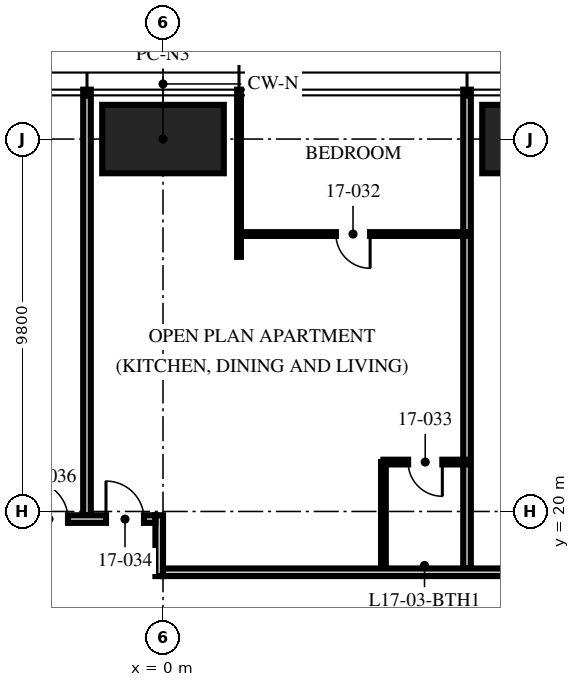
"""IFC4 building model, lengths in metres.
Left out: names, types, materials, properties, quantities, classifications, styles, units other than length and angle.
Written with IfcOpenShell. Run it as: python <this file> out.ifc"""

import sys

from ifc_helpers import new_model, si_unit, direction, frame, frame_2d, origin, origin_2d, place, context, subcontext, project, spatial, rectangle, hollow_rectangle, extrude, element, fill, save


model = new_model("IFC4")
c1 = context("Model", 3, precision=1e-05, world=origin(), true_north=direction((0.0, 1.0)))
c2 = subcontext(c1, "Body", "Model", "MODEL_VIEW")
j1 = project(units=[si_unit("LENGTHUNIT", "METRE"), si_unit("PLANEANGLEUNIT", "RADIAN")], contexts=[c1])
p1 = place(None, origin())
s1 = spatial("IfcSite", under=j1, at=p1, CompositionType="ELEMENT")
p2 = place(p1, origin())
s2 = spatial("IfcBuilding", under=s1, at=p2, CompositionType="ELEMENT")
p3 = place(p2, frame((0.0, 0.0, 69.75)))
s3 = spatial("IfcBuildingStorey", under=s2, at=p3, CompositionType="ELEMENT", Elevation=69.75)
for number, where, z_axis, x_axis in (
    (1, (0.0, 29.8, 0.0), (0.0, 0.0, 1.0), (1.0, 0.0, 0.0)),
    (2, (10.0, 29.8, 0.0), (0.0, 0.0, 1.0), (1.0, 0.0, 0.0)),
):
    element("IfcColumn", number, at=place(p3, frame(where, z_axis=z_axis, x_axis=x_axis)), inside=s3, PredefinedType="COLUMN", context=c2, shape_type="SweptSolid", body=[
        extrude(hollow_rectangle(XDim=3.2, YDim=1.8, WallThickness=0.2, at=origin_2d()), origin(), (0.0, 0.0, 1.0), 3.75),
    ])
p4 = place(p3, frame((8.0, 18.5, 0.0), z_axis=(0.0, 0.0, 1.0), x_axis=(0.0, 1.0, 0.0)))
e3 = element("IfcWall", 3, at=p4, inside=s3, PredefinedType="PARTITIONING", context=c2, shape_type="SweptSolid", body=[
    extrude(rectangle(XDim=12.6, YDim=0.2, at=frame_2d((6.3, 0.0))), origin(), (0.0, 0.0, 1.0), 2.71),
])
p5 = place(p3, frame((2.0, 26.7, 0.0), z_axis=(0.0, 0.0, 1.0), x_axis=(0.0, 1.0, 0.0)))
e4 = element("IfcWall", 4, at=p5, inside=s3, PredefinedType="PARTITIONING", context=c2, shape_type="SweptSolid", body=[
    extrude(rectangle(XDim=4.4, YDim=0.1, at=frame_2d((2.2, 0.0))), origin(), (0.0, 0.0, 1.0), 2.71),
])
p6 = place(p3, frame((-2.0, 19.9, 0.0), z_axis=(0.0, 0.0, 1.0), x_axis=(0.0, 1.0, 0.0)))
e5 = element("IfcWall", 5, at=p6, inside=s3, PredefinedType="PARTITIONING", context=c2, shape_type="SweptSolid", body=[
    extrude(rectangle(XDim=11.2, YDim=0.2, at=frame_2d((5.6, 0.0))), origin(), (0.0, 0.0, 1.0), 2.71),
])
p7 = place(p3, frame((8.0, 27.3, 0.0), z_axis=(0.0, 0.0, 1.0), x_axis=(-1.0, 0.0, 0.0)))
e6 = element("IfcWall", 6, at=p7, inside=s3, PredefinedType="PARTITIONING", context=c2, shape_type="SweptSolid", body=[
    extrude(rectangle(XDim=6.0, YDim=0.1, at=frame_2d((3.0, 0.0))), origin(), (0.0, 0.0, 1.0), 2.61),
])
p8 = place(p7, frame((2.55, 0.0, 0.0)))
e7 = element("IfcOpeningElement", 7, at=p8, cuts=e6, PredefinedType="OPENING", context=c2, shape_type="SweptSolid", body=[
    extrude(rectangle(XDim=0.9, YDim=2.1, at=frame_2d((0.45, 1.05))), frame((0.0, 0.06, 0.0), z_axis=(0.0, -1.0, 0.0), x_axis=(1.0, 0.0, 0.0)), (0.0, 0.0, 1.0), 0.12),
])
p9 = place(p3, frame((8.0, 21.3, 0.0), z_axis=(0.0, 0.0, 1.0), x_axis=(-1.0, 0.0, 0.0)))
e8 = element("IfcWall", 8, at=p9, inside=s3, PredefinedType="PARTITIONING", context=c2, shape_type="SweptSolid", body=[
    extrude(rectangle(XDim=2.2, YDim=0.125, at=frame_2d((1.1, 0.0))), origin(), (0.0, 0.0, 1.0), 3.5),
])
p10 = place(p9, frame((0.65, 0.0, 0.0)))
e9 = element("IfcOpeningElement", 9, at=p10, cuts=e8, PredefinedType="OPENING", context=c2, shape_type="SweptSolid", body=[
    extrude(rectangle(XDim=0.9, YDim=2.1, at=frame_2d((0.45, 1.05))), frame((0.0, 0.073, 0.0), z_axis=(0.0, -1.0, 0.0), x_axis=(1.0, 0.0, 0.0)), (0.0, 0.0, 1.0), 0.145),
])
p11 = place(p3, frame((5.8, 18.5, 0.0), z_axis=(0.0, 0.0, 1.0), x_axis=(0.0, 1.0, 0.0)))
e10 = element("IfcWall", 10, at=p11, inside=s3, PredefinedType="PARTITIONING", context=c2, shape_type="SweptSolid", body=[
    extrude(rectangle(XDim=2.8, YDim=0.125, at=frame_2d((1.4, 0.0))), origin(), (0.0, 0.0, 1.0), 3.5),
])
p12 = place(p3, frame((-0.1, 18.3, 0.0), z_axis=(0.0, 0.0, 1.0), x_axis=(0.0, 1.0, 0.0)))
e11 = element("IfcWall", 11, at=p12, inside=s3, PredefinedType="PARTITIONING", context=c2, shape_type="SweptSolid", body=[
    extrude(rectangle(XDim=1.6, YDim=0.2, at=frame_2d((0.8, 0.0))), origin(), (0.0, 0.0, 1.0), 2.492),
])
p13 = place(p3, frame((-3.8, 19.8, 0.0), z_axis=(0.0, 0.0, 1.0), x_axis=(1.0, 0.0, 0.0)))
e12 = element("IfcWall", 12, at=p13, inside=s3, PredefinedType="PARTITIONING", context=c2, shape_type="SweptSolid", body=[
    extrude(rectangle(XDim=3.6, YDim=0.2, at=frame_2d((1.8, 0.0))), origin(), (0.0, 0.0, 1.0), 3.5),
])
p14 = place(p13, frame((2.3, 0.0, 0.0)))
e13 = element("IfcOpeningElement", 13, at=p14, cuts=e12, PredefinedType="OPENING", context=c2, shape_type="SweptSolid", body=[
    extrude(rectangle(XDim=1.0, YDim=2.2, at=frame_2d((0.5, 1.1))), frame((0.0, 0.11, 0.0), z_axis=(0.0, -1.0, 0.0), x_axis=(1.0, 0.0, 0.0)), (0.0, 0.0, 1.0), 0.22),
])
p15 = place(p13, frame((0.3, 0.0, 0.0)))
e14 = element("IfcOpeningElement", 14, at=p15, cuts=e12, PredefinedType="OPENING", context=c2, shape_type="SweptSolid", body=[
    extrude(rectangle(XDim=1.0, YDim=2.2, at=frame_2d((0.5, 1.1))), frame((0.0, 0.11, 0.0), z_axis=(0.0, -1.0, 0.0), x_axis=(1.0, 0.0, 0.0)), (0.0, 0.0, 1.0), 0.22),
])
p16 = place(p3, frame((0.0, 18.4, 0.0), z_axis=(0.0, 0.0, 1.0), x_axis=(1.0, 0.0, 0.0)))
e15 = element("IfcWall", 15, at=p16, inside=s3, PredefinedType="PARTITIONING", context=c2, shape_type="SweptSolid", body=[
    extrude(rectangle(XDim=18.5, YDim=0.2, at=frame_2d((9.25, 0.0))), origin(), (0.0, 0.0, 1.0), 2.3),
])
p17 = place(p8, origin())
e16 = element("IfcDoor", 16, at=p17, inside=s3, OperationType="SINGLE_SWING_LEFT", PredefinedType="DOOR", context=c2, shape_type="SweptSolid", body=[
    extrude(rectangle(XDim=0.9, YDim=2.1, at=frame_2d((0.45, 1.05))), frame((0.0, 0.025, 0.0), z_axis=(0.0, -1.0, 0.0), x_axis=(1.0, 0.0, 0.0)), (0.0, 0.0, 1.0), 0.05),
])
fill(e7, e16)
p18 = place(p10, origin())
e17 = element("IfcDoor", 17, at=p18, inside=s3, OperationType="SINGLE_SWING_LEFT", PredefinedType="DOOR", context=c2, shape_type="SweptSolid", body=[
    extrude(rectangle(XDim=0.9, YDim=2.1, at=frame_2d((0.45, 1.05))), frame((0.0, 0.025, 0.0), z_axis=(0.0, -1.0, 0.0), x_axis=(1.0, 0.0, 0.0)), (0.0, 0.0, 1.0), 0.05),
])
fill(e9, e17)
p19 = place(p14, origin())
e18 = element("IfcDoor", 18, at=p19, inside=s3, OperationType="SINGLE_SWING_LEFT", PredefinedType="DOOR", context=c2, shape_type="SweptSolid", body=[
    extrude(rectangle(XDim=1.0, YDim=2.2, at=frame_2d((0.5, 1.1))), frame((0.0, 0.025, 0.0), z_axis=(0.0, -1.0, 0.0), x_axis=(1.0, 0.0, 0.0)), (0.0, 0.0, 1.0), 0.05),
])
fill(e13, e18)
p20 = place(p15, origin())
e19 = element("IfcDoor", 19, at=p20, inside=s3, OperationType="SINGLE_SWING_LEFT", PredefinedType="DOOR", context=c2, shape_type="SweptSolid", body=[
    extrude(rectangle(XDim=1.0, YDim=2.2, at=frame_2d((0.5, 1.1))), frame((0.0, 0.025, 0.0), z_axis=(0.0, -1.0, 0.0), x_axis=(1.0, 0.0, 0.0)), (0.0, 0.0, 1.0), 0.05),
])
fill(e14, e19)
save(model, sys.argv[1])
